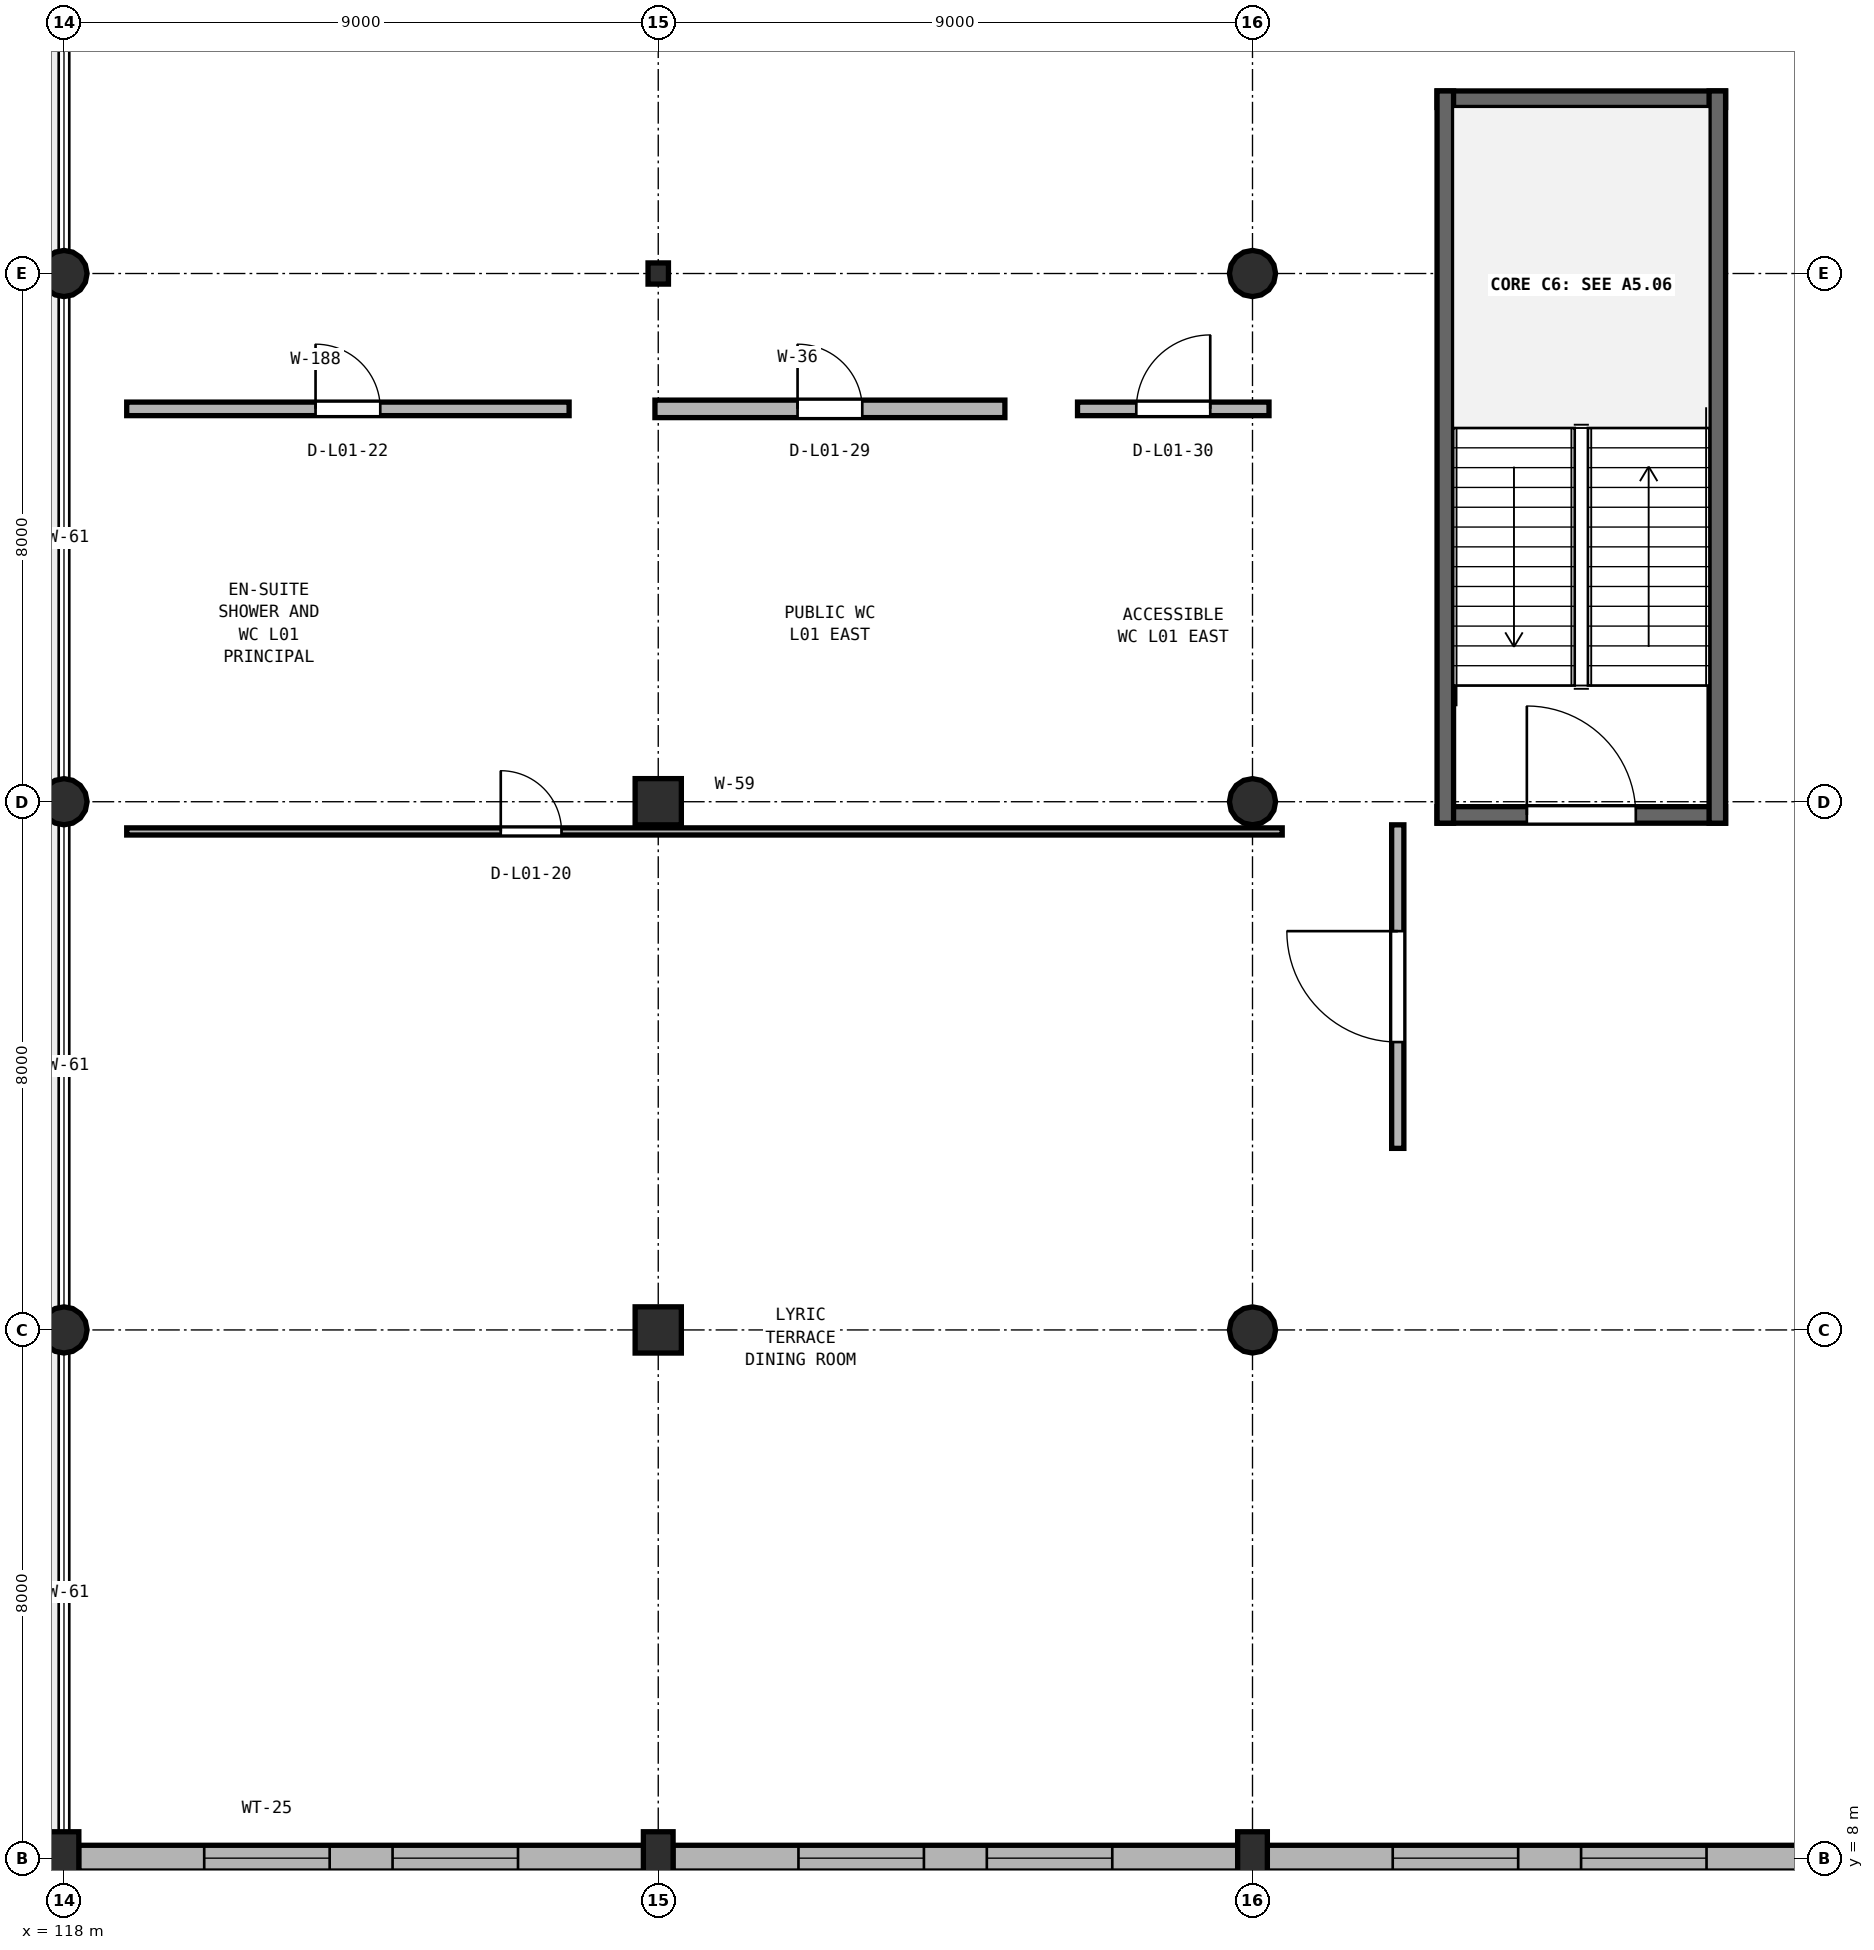
"""IFC4 building model, lengths in metres.
Left out: names, types, materials, properties, quantities, classifications, styles, units other than length and angle.
Written with IfcOpenShell. Run it as: python <this file> out.ifc"""

import sys

from ifc_helpers import new_model, si_unit, direction, frame, frame_2d, origin, origin_2d, place, context, subcontext, project, spatial, rectangle, circle, i_section, extrude, element, fill, save


model = new_model("IFC4")
c1 = context("Model", 3, precision=1e-05, world=origin(), true_north=direction((0.0, 1.0)))
c2 = subcontext(c1, "Body", "Model", "MODEL_VIEW")
j1 = project(units=[si_unit("LENGTHUNIT", "METRE"), si_unit("PLANEANGLEUNIT", "RADIAN")], contexts=[c1])
p1 = place(None, origin())
s1 = spatial("IfcSite", under=j1, at=p1, CompositionType="ELEMENT")
p2 = place(p1, origin())
s2 = spatial("IfcBuilding", under=s1, at=p2, CompositionType="ELEMENT")
p3 = place(p2, frame((0.0, 0.0, 5.4)))
s3 = spatial("IfcBuildingStorey", under=s2, at=p3, CompositionType="ELEMENT", Elevation=5.4)
p4 = place(p3, frame((118.0, 8.0, 0.0), z_axis=(0.0, 0.0, 1.0), x_axis=(1.0, 0.0, 0.0)))
e1 = element("IfcColumn", 1, at=p4, inside=s3, PredefinedType="PILASTER", context=c2, shape_type="SweptSolid", body=[
    extrude(rectangle(XDim=0.45, YDim=0.8, at=origin_2d()), origin(), (0.0, 0.0, 1.0), 4.54),
])
for number, where, z_axis, x_axis in (
    (2, (118.0, 16.0, 0.0), (0.0, 0.0, 1.0), (1.0, 0.0, 0.0)),
    (3, (118.0, 24.0, 0.0), (0.0, 0.0, 1.0), (1.0, 0.0, 0.0)),
    (4, (118.0, 32.0, 0.0), (0.0, 0.0, 1.0), (1.0, 0.0, 0.0)),
):
    element("IfcColumn", number, at=place(p3, frame(where, z_axis=z_axis, x_axis=x_axis)), inside=s3, PredefinedType="COLUMN", context=c2, shape_type="SweptSolid", body=[
        extrude(circle(Radius=0.35, at=origin_2d()), origin(), (0.0, 0.0, 1.0), 4.54),
    ])
p5 = place(p3, frame((127.0, 8.0, 0.0), z_axis=(0.0, 0.0, 1.0), x_axis=(1.0, 0.0, 0.0)))
e5 = element("IfcColumn", 5, at=p5, inside=s3, PredefinedType="PILASTER", context=c2, shape_type="SweptSolid", body=[
    extrude(rectangle(XDim=0.45, YDim=0.8, at=origin_2d()), origin(), (0.0, 0.0, 1.0), 4.54),
])
for number, where, z_axis, x_axis in (
    (6, (127.0, 16.0, 0.0), (0.0, 0.0, 1.0), (1.0, 0.0, 0.0)),
    (7, (127.0, 24.0, 0.0), (0.0, 0.0, 1.0), (1.0, 0.0, 0.0)),
):
    element("IfcColumn", number, at=place(p3, frame(where, z_axis=z_axis, x_axis=x_axis)), inside=s3, PredefinedType="COLUMN", context=c2, shape_type="SweptSolid", body=[
        extrude(rectangle(XDim=0.7, YDim=0.7, at=origin_2d()), origin(), (0.0, 0.0, 1.0), 4.54),
    ])
p6 = place(p3, frame((127.0, 32.0, 0.0), z_axis=(0.0, 0.0, 1.0), x_axis=(1.0, 0.0, 0.0)))
e8 = element("IfcColumn", 8, at=p6, inside=s3, PredefinedType="COLUMN", context=c2, shape_type="SweptSolid", body=[
    extrude(i_section(OverallWidth=0.309, OverallDepth=0.321, WebThickness=0.014, FlangeThickness=0.022, FilletRadius=0.017, at=origin_2d()), origin(), (0.0, 0.0, 1.0), 4.54),
])
p7 = place(p3, frame((136.0, 8.0, 0.0), z_axis=(0.0, 0.0, 1.0), x_axis=(1.0, 0.0, 0.0)))
e9 = element("IfcColumn", 9, at=p7, inside=s3, PredefinedType="PILASTER", context=c2, shape_type="SweptSolid", body=[
    extrude(rectangle(XDim=0.45, YDim=0.8, at=origin_2d()), origin(), (0.0, 0.0, 1.0), 4.54),
])
for number, where, z_axis, x_axis in (
    (10, (136.0, 16.0, 0.0), (0.0, 0.0, 1.0), (1.0, 0.0, 0.0)),
    (11, (136.0, 24.0, 0.0), (0.0, 0.0, 1.0), (1.0, 0.0, 0.0)),
    (12, (136.0, 32.0, 0.0), (0.0, 0.0, 1.0), (1.0, 0.0, 0.0)),
):
    element("IfcColumn", number, at=place(p3, frame(where, z_axis=z_axis, x_axis=x_axis)), inside=s3, PredefinedType="COLUMN", context=c2, shape_type="SweptSolid", body=[
        extrude(circle(Radius=0.35, at=origin_2d()), origin(), (0.0, 0.0, 1.0), 4.54),
    ])
p8 = place(p3, frame((118.221, 8.0, 0.0), z_axis=(0.0, 0.0, 1.0), x_axis=(1.0, 0.0, 0.0)))
e13 = element("IfcWall", 13, at=p8, inside=s3, PredefinedType="SOLIDWALL", context=c2, shape_type="SweptSolid", body=[
    extrude(rectangle(XDim=8.558, YDim=0.39, at=frame_2d((4.279, 0.0))), origin(), (0.0, 0.0, 1.0), 4.152),
])
p9 = place(p8, frame((1.903, 0.0, 0.75)))
e14 = element("IfcOpeningElement", 14, at=p9, cuts=e13, PredefinedType="OPENING", context=c2, shape_type="SweptSolid", body=[
    extrude(rectangle(XDim=1.9, YDim=2.75, at=frame_2d((0.95, 1.375))), frame((0.0, 0.205, 0.0), z_axis=(0.0, -1.0, 0.0), x_axis=(1.0, 0.0, 0.0)), (0.0, 0.0, 1.0), 0.41),
])
p10 = place(p8, frame((4.755, 0.0, 0.75)))
e15 = element("IfcOpeningElement", 15, at=p10, cuts=e13, PredefinedType="OPENING", context=c2, shape_type="SweptSolid", body=[
    extrude(rectangle(XDim=1.9, YDim=2.75, at=frame_2d((0.95, 1.375))), frame((0.0, 0.205, 0.0), z_axis=(0.0, -1.0, 0.0), x_axis=(1.0, 0.0, 0.0)), (0.0, 0.0, 1.0), 0.41),
])
p11 = place(p3, frame((127.221, 8.0, 0.0), z_axis=(0.0, 0.0, 1.0), x_axis=(1.0, 0.0, 0.0)))
e16 = element("IfcWall", 16, at=p11, inside=s3, PredefinedType="SOLIDWALL", context=c2, shape_type="SweptSolid", body=[
    extrude(rectangle(XDim=8.558, YDim=0.39, at=frame_2d((4.279, 0.0))), origin(), (0.0, 0.0, 1.0), 4.152),
])
p12 = place(p11, frame((1.903, 0.0, 0.75)))
e17 = element("IfcOpeningElement", 17, at=p12, cuts=e16, PredefinedType="OPENING", context=c2, shape_type="SweptSolid", body=[
    extrude(rectangle(XDim=1.9, YDim=2.75, at=frame_2d((0.95, 1.375))), frame((0.0, 0.205, 0.0), z_axis=(0.0, -1.0, 0.0), x_axis=(1.0, 0.0, 0.0)), (0.0, 0.0, 1.0), 0.41),
])
p13 = place(p11, frame((4.755, 0.0, 0.75)))
e18 = element("IfcOpeningElement", 18, at=p13, cuts=e16, PredefinedType="OPENING", context=c2, shape_type="SweptSolid", body=[
    extrude(rectangle(XDim=1.9, YDim=2.75, at=frame_2d((0.95, 1.375))), frame((0.0, 0.205, 0.0), z_axis=(0.0, -1.0, 0.0), x_axis=(1.0, 0.0, 0.0)), (0.0, 0.0, 1.0), 0.41),
])
p14 = place(p3, frame((136.221, 8.0, 0.0), z_axis=(0.0, 0.0, 1.0), x_axis=(1.0, 0.0, 0.0)))
e19 = element("IfcWall", 19, at=p14, inside=s3, PredefinedType="SOLIDWALL", context=c2, shape_type="SweptSolid", body=[
    extrude(rectangle(XDim=8.558, YDim=0.39, at=frame_2d((4.279, 0.0))), origin(), (0.0, 0.0, 1.0), 4.152),
])
p15 = place(p14, frame((1.903, 0.0, 0.75)))
e20 = element("IfcOpeningElement", 20, at=p15, cuts=e19, PredefinedType="OPENING", context=c2, shape_type="SweptSolid", body=[
    extrude(rectangle(XDim=1.9, YDim=2.75, at=frame_2d((0.95, 1.375))), frame((0.0, 0.205, 0.0), z_axis=(0.0, -1.0, 0.0), x_axis=(1.0, 0.0, 0.0)), (0.0, 0.0, 1.0), 0.41),
])
p16 = place(p14, frame((4.755, 0.0, 0.75)))
e21 = element("IfcOpeningElement", 21, at=p16, cuts=e19, PredefinedType="OPENING", context=c2, shape_type="SweptSolid", body=[
    extrude(rectangle(XDim=1.9, YDim=2.75, at=frame_2d((0.95, 1.375))), frame((0.0, 0.205, 0.0), z_axis=(0.0, -1.0, 0.0), x_axis=(1.0, 0.0, 0.0)), (0.0, 0.0, 1.0), 0.41),
])
p17 = place(p3, frame((138.795, 23.8, 0.0), z_axis=(0.0, 0.0, 1.0), x_axis=(1.0, 0.0, 0.0)))
e22 = element("IfcWall", 22, at=p17, inside=s3, PredefinedType="SHEAR", context=c2, shape_type="SweptSolid", body=[
    extrude(rectangle(XDim=4.37, YDim=0.25, at=frame_2d((2.185, 0.0))), origin(), (0.0, 0.0, 1.0), 4.54),
])
p18 = place(p17, frame((1.36, 0.0, 0.0)))
e23 = element("IfcOpeningElement", 23, at=p18, cuts=e22, PredefinedType="OPENING", context=c2, shape_type="SweptSolid", body=[
    extrude(rectangle(XDim=1.65, YDim=2.22, at=frame_2d((0.825, 1.11))), frame((0.0, 0.135, 0.0), z_axis=(0.0, -1.0, 0.0), x_axis=(1.0, 0.0, 0.0)), (0.0, 0.0, 1.0), 0.27),
])
p19 = place(p3, frame((138.795, 34.64, 0.0), z_axis=(0.0, 0.0, 1.0), x_axis=(1.0, 0.0, 0.0)))
e24 = element("IfcWall", 24, at=p19, inside=s3, PredefinedType="SHEAR", context=c2, shape_type="SweptSolid", body=[
    extrude(rectangle(XDim=4.37, YDim=0.25, at=frame_2d((2.185, 0.0))), origin(), (0.0, 0.0, 1.0), 4.54),
])
for number, where, z_axis, x_axis in (
    (25, (138.92, 23.675, 0.0), (0.0, 0.0, 1.0), (0.0, 1.0, 0.0)),
    (26, (143.04, 23.675, 0.0), (0.0, 0.0, 1.0), (0.0, 1.0, 0.0)),
):
    element("IfcWall", number, at=place(p3, frame(where, z_axis=z_axis, x_axis=x_axis)), inside=s3, PredefinedType="SHEAR", context=c2, shape_type="SweptSolid", body=[
        extrude(rectangle(XDim=11.09, YDim=0.25, at=frame_2d((5.545, 0.0))), origin(), (0.0, 0.0, 1.0), 4.54),
    ])
p20 = place(p3, frame((138.2, 18.75, 0.0), z_axis=(0.0, 0.0, 1.0), x_axis=(0.0, 1.0, 0.0)))
e27 = element("IfcWall", 27, at=p20, inside=s3, PredefinedType="PARTITIONING", context=c2, shape_type="SweptSolid", body=[
    extrude(rectangle(XDim=4.9, YDim=0.185, at=frame_2d((2.45, 0.0))), origin(), (0.0, 0.0, 1.0), 4.49),
])
p21 = place(p20, frame((1.61, 0.0, 0.0)))
e28 = element("IfcOpeningElement", 28, at=p21, cuts=e27, PredefinedType="OPENING", context=c2, shape_type="SweptSolid", body=[
    extrude(rectangle(XDim=1.68, YDim=2.25, at=frame_2d((0.84, 1.125))), frame((0.0, 0.103, 0.0), z_axis=(0.0, -1.0, 0.0), x_axis=(1.0, 0.0, 0.0)), (0.0, 0.0, 1.0), 0.205),
])
p22 = place(p3, frame((118.95, 23.55, 0.0), z_axis=(0.0, 0.0, 1.0), x_axis=(1.0, 0.0, 0.0)))
e29 = element("IfcWall", 29, at=p22, inside=s3, PredefinedType="PARTITIONING", context=c2, shape_type="SweptSolid", body=[
    extrude(rectangle(XDim=17.5, YDim=0.108, at=frame_2d((8.75, 0.0))), origin(), (0.0, 0.0, 1.0), 3.898),
])
p23 = place(p22, frame((5.665, 0.0, 0.0)))
e30 = element("IfcOpeningElement", 30, at=p23, cuts=e29, PredefinedType="OPENING", context=c2, shape_type="SweptSolid", body=[
    extrude(rectangle(XDim=0.92, YDim=2.12, at=frame_2d((0.46, 1.06))), frame((0.0, 0.064, 0.0), z_axis=(0.0, -1.0, 0.0), x_axis=(1.0, 0.0, 0.0)), (0.0, 0.0, 1.0), 0.128),
])
p24 = place(p3, frame((118.95, 29.95, 0.0), z_axis=(0.0, 0.0, 1.0), x_axis=(1.0, 0.0, 0.0)))
e31 = element("IfcWall", 31, at=p24, inside=s3, PredefinedType="PLUMBINGWALL", context=c2, shape_type="SweptSolid", body=[
    extrude(rectangle(XDim=6.7, YDim=0.205, at=frame_2d((3.35, 0.0))), origin(), (0.0, 0.0, 1.0), 4.49),
])
p25 = place(p24, frame((2.86, 0.0, 0.0)))
e32 = element("IfcOpeningElement", 32, at=p25, cuts=e31, PredefinedType="OPENING", context=c2, shape_type="SweptSolid", body=[
    extrude(rectangle(XDim=0.98, YDim=2.14, at=frame_2d((0.49, 1.07))), frame((0.0, 0.113, 0.0), z_axis=(0.0, -1.0, 0.0), x_axis=(1.0, 0.0, 0.0)), (0.0, 0.0, 1.0), 0.225),
])
p26 = place(p3, frame((126.95, 29.95, 0.0), z_axis=(0.0, 0.0, 1.0), x_axis=(1.0, 0.0, 0.0)))
e33 = element("IfcWall", 33, at=p26, inside=s3, PredefinedType="PLUMBINGWALL", context=c2, shape_type="SweptSolid", body=[
    extrude(rectangle(XDim=5.3, YDim=0.265, at=frame_2d((2.65, 0.0))), origin(), (0.0, 0.0, 1.0), 4.49),
])
p27 = place(p26, frame((2.16, 0.0, 0.0)))
e34 = element("IfcOpeningElement", 34, at=p27, cuts=e33, PredefinedType="OPENING", context=c2, shape_type="SweptSolid", body=[
    extrude(rectangle(XDim=0.98, YDim=2.14, at=frame_2d((0.49, 1.07))), frame((0.0, 0.142, 0.0), z_axis=(0.0, -1.0, 0.0), x_axis=(1.0, 0.0, 0.0)), (0.0, 0.0, 1.0), 0.285),
])
p28 = place(p3, frame((133.35, 29.95, 0.0), z_axis=(0.0, 0.0, 1.0), x_axis=(1.0, 0.0, 0.0)))
e35 = element("IfcWall", 35, at=p28, inside=s3, PredefinedType="PLUMBINGWALL", context=c2, shape_type="SweptSolid", body=[
    extrude(rectangle(XDim=2.9, YDim=0.205, at=frame_2d((1.45, 0.0))), origin(), (0.0, 0.0, 1.0), 4.49),
])
p29 = place(p28, frame((0.89, 0.0, 0.0)))
e36 = element("IfcOpeningElement", 36, at=p29, cuts=e35, PredefinedType="OPENING", context=c2, shape_type="SweptSolid", body=[
    extrude(rectangle(XDim=1.12, YDim=2.16, at=frame_2d((0.56, 1.08))), frame((0.0, 0.113, 0.0), z_axis=(0.0, -1.0, 0.0), x_axis=(1.0, 0.0, 0.0)), (0.0, 0.0, 1.0), 0.225),
])
p30 = place(p9, origin())
e37 = element("IfcWindow", 37, at=p30, inside=s3, PartitioningType="SINGLE_PANEL", PredefinedType="WINDOW", context=c2, shape_type="SweptSolid", body=[
    extrude(rectangle(XDim=1.9, YDim=2.75, at=frame_2d((0.95, 1.375))), frame((0.0, 0.03, 0.0), z_axis=(0.0, -1.0, 0.0), x_axis=(1.0, 0.0, 0.0)), (0.0, 0.0, 1.0), 0.06),
])
fill(e14, e37)
p31 = place(p10, origin())
e38 = element("IfcWindow", 38, at=p31, inside=s3, PartitioningType="SINGLE_PANEL", PredefinedType="WINDOW", context=c2, shape_type="SweptSolid", body=[
    extrude(rectangle(XDim=1.9, YDim=2.75, at=frame_2d((0.95, 1.375))), frame((0.0, 0.03, 0.0), z_axis=(0.0, -1.0, 0.0), x_axis=(1.0, 0.0, 0.0)), (0.0, 0.0, 1.0), 0.06),
])
fill(e15, e38)
p32 = place(p12, origin())
e39 = element("IfcWindow", 39, at=p32, inside=s3, PartitioningType="SINGLE_PANEL", PredefinedType="WINDOW", context=c2, shape_type="SweptSolid", body=[
    extrude(rectangle(XDim=1.9, YDim=2.75, at=frame_2d((0.95, 1.375))), frame((0.0, 0.03, 0.0), z_axis=(0.0, -1.0, 0.0), x_axis=(1.0, 0.0, 0.0)), (0.0, 0.0, 1.0), 0.06),
])
fill(e17, e39)
p33 = place(p13, origin())
e40 = element("IfcWindow", 40, at=p33, inside=s3, PartitioningType="SINGLE_PANEL", PredefinedType="WINDOW", context=c2, shape_type="SweptSolid", body=[
    extrude(rectangle(XDim=1.9, YDim=2.75, at=frame_2d((0.95, 1.375))), frame((0.0, 0.03, 0.0), z_axis=(0.0, -1.0, 0.0), x_axis=(1.0, 0.0, 0.0)), (0.0, 0.0, 1.0), 0.06),
])
fill(e18, e40)
p34 = place(p15, origin())
e41 = element("IfcWindow", 41, at=p34, inside=s3, PartitioningType="SINGLE_PANEL", PredefinedType="WINDOW", context=c2, shape_type="SweptSolid", body=[
    extrude(rectangle(XDim=1.9, YDim=2.75, at=frame_2d((0.95, 1.375))), frame((0.0, 0.03, 0.0), z_axis=(0.0, -1.0, 0.0), x_axis=(1.0, 0.0, 0.0)), (0.0, 0.0, 1.0), 0.06),
])
fill(e20, e41)
p35 = place(p16, origin())
e42 = element("IfcWindow", 42, at=p35, inside=s3, PartitioningType="SINGLE_PANEL", PredefinedType="WINDOW", context=c2, shape_type="SweptSolid", body=[
    extrude(rectangle(XDim=1.9, YDim=2.75, at=frame_2d((0.95, 1.375))), frame((0.0, 0.03, 0.0), z_axis=(0.0, -1.0, 0.0), x_axis=(1.0, 0.0, 0.0)), (0.0, 0.0, 1.0), 0.06),
])
fill(e21, e42)
p36 = place(p18, origin())
e43 = element("IfcDoor", 43, at=p36, inside=s3, OperationType="SINGLE_SWING_LEFT", PredefinedType="DOOR", context=c2, shape_type="SweptSolid", body=[
    extrude(rectangle(XDim=1.65, YDim=2.22, at=frame_2d((0.825, 1.11))), frame((0.0, 0.025, 0.0), z_axis=(0.0, -1.0, 0.0), x_axis=(1.0, 0.0, 0.0)), (0.0, 0.0, 1.0), 0.05),
])
fill(e23, e43)
p37 = place(p21, origin())
e44 = element("IfcDoor", 44, at=p37, inside=s3, OperationType="SINGLE_SWING_RIGHT", PredefinedType="DOOR", context=c2, shape_type="SweptSolid", body=[
    extrude(rectangle(XDim=1.68, YDim=2.25, at=frame_2d((0.84, 1.125))), frame((0.0, 0.025, 0.0), z_axis=(0.0, -1.0, 0.0), x_axis=(1.0, 0.0, 0.0)), (0.0, 0.0, 1.0), 0.05),
])
fill(e28, e44)
p38 = place(p23, origin())
e45 = element("IfcDoor", 45, at=p38, inside=s3, OperationType="SINGLE_SWING_LEFT", PredefinedType="DOOR", context=c2, shape_type="SweptSolid", body=[
    extrude(rectangle(XDim=0.92, YDim=2.12, at=frame_2d((0.46, 1.06))), frame((0.0, 0.025, 0.0), z_axis=(0.0, -1.0, 0.0), x_axis=(1.0, 0.0, 0.0)), (0.0, 0.0, 1.0), 0.05),
])
fill(e30, e45)
p39 = place(p25, origin())
e46 = element("IfcDoor", 46, at=p39, inside=s3, OperationType="SINGLE_SWING_LEFT", PredefinedType="DOOR", context=c2, shape_type="SweptSolid", body=[
    extrude(rectangle(XDim=0.98, YDim=2.14, at=frame_2d((0.49, 1.07))), frame((0.0, 0.025, 0.0), z_axis=(0.0, -1.0, 0.0), x_axis=(1.0, 0.0, 0.0)), (0.0, 0.0, 1.0), 0.05),
])
fill(e32, e46)
p40 = place(p27, origin())
e47 = element("IfcDoor", 47, at=p40, inside=s3, OperationType="SINGLE_SWING_LEFT", PredefinedType="DOOR", context=c2, shape_type="SweptSolid", body=[
    extrude(rectangle(XDim=0.98, YDim=2.14, at=frame_2d((0.49, 1.07))), frame((0.0, 0.025, 0.0), z_axis=(0.0, -1.0, 0.0), x_axis=(1.0, 0.0, 0.0)), (0.0, 0.0, 1.0), 0.05),
])
fill(e34, e47)
p41 = place(p29, origin())
e48 = element("IfcDoor", 48, at=p41, inside=s3, OperationType="SINGLE_SWING_RIGHT", PredefinedType="DOOR", context=c2, shape_type="SweptSolid", body=[
    extrude(rectangle(XDim=1.12, YDim=2.16, at=frame_2d((0.56, 1.08))), frame((0.0, 0.025, 0.0), z_axis=(0.0, -1.0, 0.0), x_axis=(1.0, 0.0, 0.0)), (0.0, 0.0, 1.0), 0.05),
])
fill(e36, e48)
save(model, sys.argv[1])
